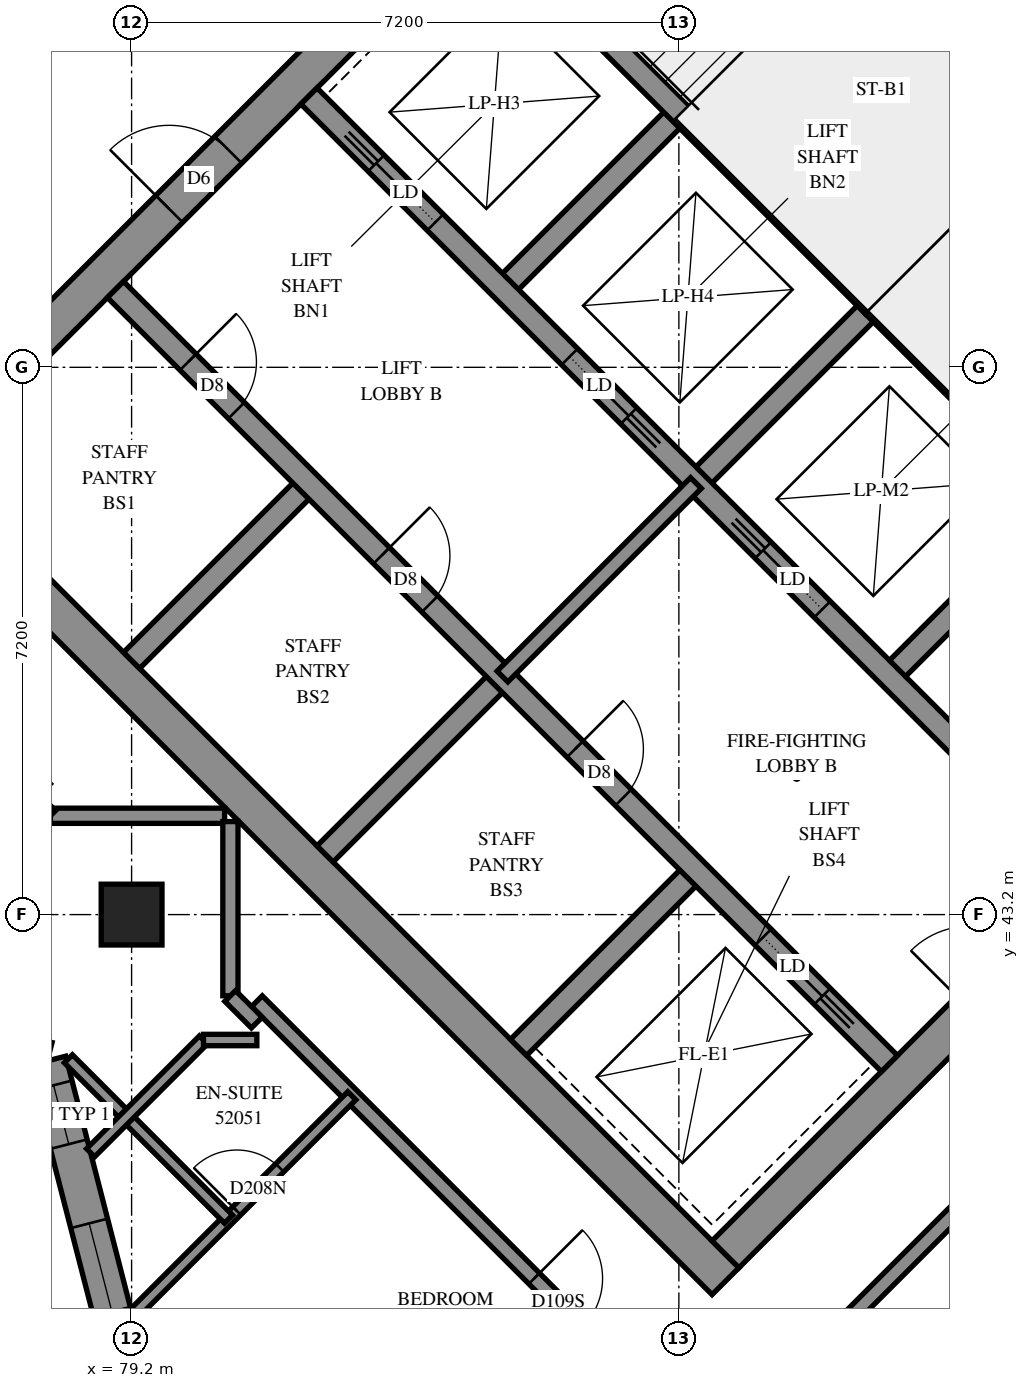
"""IFC4 building model, lengths in metres.
Left out: names, types, materials, properties, quantities, classifications, styles, units other than length and angle.
Written with IfcOpenShell. Run it as: python <this file> out.ifc"""

import sys

from ifc_helpers import new_model, si_unit, direction, frame, frame_2d, origin, origin_2d, place, context, subcontext, project, spatial, polyline, rectangle, outline, extrude, element, fill, save


model = new_model("IFC4")
c1 = context("Model", 3, precision=1e-05, world=origin(), true_north=direction((0.0, 1.0)))
c2 = subcontext(c1, "Body", "Model", "MODEL_VIEW")
j1 = project(units=[si_unit("LENGTHUNIT", "METRE"), si_unit("PLANEANGLEUNIT", "RADIAN")], contexts=[c1])
p1 = place(None, origin())
s1 = spatial("IfcSite", under=j1, at=p1, CompositionType="ELEMENT")
p2 = place(p1, origin())
s2 = spatial("IfcBuilding", under=s1, at=p2, CompositionType="ELEMENT")
p3 = place(p2, frame((0.0, 0.0, 193.0)))
s3 = spatial("IfcBuildingStorey", under=s2, at=p3, CompositionType="ELEMENT", Elevation=193.0)
p4 = place(p3, frame((79.2, 43.2, 0.0), z_axis=(0.0, 0.0, 1.0), x_axis=(1.0, 0.0, 0.0)))
e1 = element("IfcColumn", 1, at=p4, inside=s3, PredefinedType="COLUMN", context=c2, shape_type="SweptSolid", body=[
    extrude(rectangle(XDim=0.8, YDim=0.8, at=origin_2d()), origin(), (0.0, 0.0, 1.0), 3.1),
])
p5 = place(p3, frame((76.124, 49.267, -0.3), z_axis=(0.0, 0.0, 1.0), x_axis=(0.7071067812, -0.7071067812, 0.0)))
e2 = element("IfcWall", 2, at=p5, inside=s3, PredefinedType="SHEAR", context=c2, shape_type="SweptSolid", body=[
    extrude(rectangle(XDim=15.4, YDim=0.5, at=frame_2d((7.7, 0.0))), origin(), (0.0, 0.0, 1.0), 2.7),
])
p6 = place(p3, frame((86.66, 59.802, -0.3), z_axis=(0.0, 0.0, 1.0), x_axis=(0.7071067812, -0.7071067812, 0.0)))
e3 = element("IfcWall", 3, at=p6, inside=s3, PredefinedType="SHEAR", context=c2, shape_type="SweptSolid", body=[
    extrude(rectangle(XDim=15.4, YDim=0.5, at=frame_2d((7.7, 0.0))), origin(), (0.0, 0.0, 1.0), 2.7),
])
p7 = place(p6, frame((10.5, 0.0, 0.3)))
e4 = element("IfcOpeningElement", 4, at=p7, cuts=e3, PredefinedType="OPENING", context=c2, shape_type="SweptSolid", body=[
    extrude(rectangle(XDim=0.8, YDim=2.1, at=frame_2d((0.4, 1.05))), frame((0.0, 0.26, 0.0), z_axis=(0.0, -1.0, 0.0), x_axis=(1.0, 0.0, 0.0)), (0.0, 0.0, 1.0), 0.52),
])
p8 = place(p3, frame((76.478, 49.267, -0.3), z_axis=(0.0, 0.0, 1.0), x_axis=(0.7071067812, 0.7071067812, 0.0)))
e5 = element("IfcWall", 5, at=p8, inside=s3, PredefinedType="SHEAR", context=c2, shape_type="SweptSolid", body=[
    extrude(rectangle(XDim=14.4, YDim=0.5, at=frame_2d((7.2, 0.0))), origin(), (0.0, 0.0, 1.0), 2.7),
])
p9 = place(p8, frame((4.55, 0.0, 0.3)))
e6 = element("IfcOpeningElement", 6, at=p9, cuts=e5, PredefinedType="OPENING", context=c2, shape_type="SweptSolid", body=[
    extrude(rectangle(XDim=1.1, YDim=2.1, at=frame_2d((0.55, 1.05))), frame((0.0, 0.26, 0.0), z_axis=(0.0, -1.0, 0.0), x_axis=(1.0, 0.0, 0.0)), (0.0, 0.0, 1.0), 0.52),
])
p10 = place(p8, frame((11.35, 0.0, 0.3)))
e7 = element("IfcOpeningElement", 7, at=p10, cuts=e5, PredefinedType="OPENING", context=c2, shape_type="SweptSolid", body=[
    extrude(rectangle(XDim=1.1, YDim=2.1, at=frame_2d((0.55, 1.05))), frame((0.0, 0.26, 0.0), z_axis=(0.0, -1.0, 0.0), x_axis=(1.0, 0.0, 0.0)), (0.0, 0.0, 1.0), 0.52),
])
p11 = place(p3, frame((87.013, 38.731, -0.3), z_axis=(0.0, 0.0, 1.0), x_axis=(0.7071067812, 0.7071067812, 0.0)))
e8 = element("IfcWall", 8, at=p11, inside=s3, PredefinedType="SHEAR", context=c2, shape_type="SweptSolid", body=[
    extrude(rectangle(XDim=14.4, YDim=0.5, at=frame_2d((7.2, 0.0))), origin(), (0.0, 0.0, 1.0), 2.7),
])
p12 = place(p11, frame((4.55, 0.0, 0.3)))
e9 = element("IfcOpeningElement", 9, at=p12, cuts=e8, PredefinedType="OPENING", context=c2, shape_type="SweptSolid", body=[
    extrude(rectangle(XDim=1.1, YDim=2.1, at=frame_2d((0.55, 1.05))), frame((0.0, 0.26, 0.0), z_axis=(0.0, -1.0, 0.0), x_axis=(1.0, 0.0, 0.0)), (0.0, 0.0, 1.0), 0.52),
])
p13 = place(p11, frame((11.35, 0.0, 0.3)))
e10 = element("IfcOpeningElement", 10, at=p13, cuts=e8, PredefinedType="OPENING", context=c2, shape_type="SweptSolid", body=[
    extrude(rectangle(XDim=1.1, YDim=2.1, at=frame_2d((0.55, 1.05))), frame((0.0, 0.26, 0.0), z_axis=(0.0, -1.0, 0.0), x_axis=(1.0, 0.0, 0.0)), (0.0, 0.0, 1.0), 0.52),
])
for number, where, z_axis, x_axis in (
    (11, (79.2, 46.544, 0.0), (0.0, 0.0, 1.0), (0.707, 0.707, 0.0)),
    (12, (84.079, 51.423, 0.0), (0.0, 0.0, 1.0), (0.707, 0.707, 0.0)),
):
    element("IfcWall", number, at=place(p3, frame(where, z_axis=z_axis, x_axis=x_axis)), inside=s3, PredefinedType="SOLIDWALL", context=c2, shape_type="SweptSolid", body=[
        extrude(rectangle(XDim=3.3, YDim=0.3, at=frame_2d((1.65, 0.0))), origin(), (0.0, 0.0, 1.0), 3.1),
    ])
p14 = place(p3, frame((81.746, 43.999, 0.0), z_axis=(0.0, 0.0, 1.0), x_axis=(0.7071067812, 0.7071067812, 0.0)))
e13 = element("IfcWall", 13, at=p14, inside=s3, PredefinedType="SOLIDWALL", context=c2, shape_type="SweptSolid", body=[
    extrude(rectangle(XDim=3.3, YDim=0.3, at=frame_2d((1.65, 0.0))), origin(), (0.0, 0.0, 1.0), 3.1),
])
p15 = place(p3, frame((86.625, 48.878, 0.0), z_axis=(0.0, 0.0, 1.0), x_axis=(0.7071067812, 0.7071067812, 0.0)))
e14 = element("IfcWall", 14, at=p15, inside=s3, PredefinedType="SOLIDWALL", context=c2, shape_type="SweptSolid", body=[
    extrude(rectangle(XDim=3.3, YDim=0.3, at=frame_2d((1.65, 0.0))), origin(), (0.0, 0.0, 1.0), 3.1),
])
p16 = place(p3, frame((84.291, 41.453, 0.0), z_axis=(0.0, 0.0, 1.0), x_axis=(0.7071067812, 0.7071067812, 0.0)))
e15 = element("IfcWall", 15, at=p16, inside=s3, PredefinedType="SOLIDWALL", context=c2, shape_type="SweptSolid", body=[
    extrude(rectangle(XDim=3.3, YDim=0.3, at=frame_2d((1.65, 0.0))), origin(), (0.0, 0.0, 1.0), 3.1),
])
p17 = place(p3, frame((89.17, 46.332, 0.0), z_axis=(0.0, 0.0, 1.0), x_axis=(0.7071067812, 0.7071067812, 0.0)))
e16 = element("IfcWall", 16, at=p17, inside=s3, PredefinedType="SOLIDWALL", context=c2, shape_type="SweptSolid", body=[
    extrude(rectangle(XDim=3.3, YDim=0.3, at=frame_2d((1.65, 0.0))), origin(), (0.0, 0.0, 1.0), 3.1),
])
p18 = place(p3, frame((78.988, 51.423, 0.0), z_axis=(0.0, 0.0, 1.0), x_axis=(0.7071067812, -0.7071067812, 0.0)))
e17 = element("IfcWall", 17, at=p18, inside=s3, PredefinedType="SOLIDWALL", context=c2, shape_type="SweptSolid", body=[
    extrude(rectangle(XDim=14.4, YDim=0.3, at=frame_2d((7.2, 0.0))), origin(), (0.0, 0.0, 1.0), 3.1),
])
p19 = place(p18, frame((1.35, 0.0, 0.0)))
e18 = element("IfcOpeningElement", 18, at=p19, cuts=e17, PredefinedType="OPENING", context=c2, shape_type="SweptSolid", body=[
    extrude(rectangle(XDim=0.9, YDim=2.1, at=frame_2d((0.45, 1.05))), frame((0.0, 0.16, 0.0), z_axis=(0.0, -1.0, 0.0), x_axis=(1.0, 0.0, 0.0)), (0.0, 0.0, 1.0), 0.32),
])
p20 = place(p18, frame((4.95, 0.0, 0.0)))
e19 = element("IfcOpeningElement", 19, at=p20, cuts=e17, PredefinedType="OPENING", context=c2, shape_type="SweptSolid", body=[
    extrude(rectangle(XDim=0.9, YDim=2.1, at=frame_2d((0.45, 1.05))), frame((0.0, 0.16, 0.0), z_axis=(0.0, -1.0, 0.0), x_axis=(1.0, 0.0, 0.0)), (0.0, 0.0, 1.0), 0.32),
])
p21 = place(p18, frame((8.55, 0.0, 0.0)))
e20 = element("IfcOpeningElement", 20, at=p21, cuts=e17, PredefinedType="OPENING", context=c2, shape_type="SweptSolid", body=[
    extrude(rectangle(XDim=0.9, YDim=2.1, at=frame_2d((0.45, 1.05))), frame((0.0, 0.16, 0.0), z_axis=(0.0, -1.0, 0.0), x_axis=(1.0, 0.0, 0.0)), (0.0, 0.0, 1.0), 0.32),
])
p22 = place(p18, frame((12.05, 0.0, 0.0)))
e21 = element("IfcOpeningElement", 21, at=p22, cuts=e17, PredefinedType="OPENING", context=c2, shape_type="SweptSolid", body=[
    extrude(rectangle(XDim=1.1, YDim=2.1, at=frame_2d((0.55, 1.05))), frame((0.0, 0.16, 0.0), z_axis=(0.0, -1.0, 0.0), x_axis=(1.0, 0.0, 0.0)), (0.0, 0.0, 1.0), 0.32),
])
p23 = place(p3, frame((81.534, 53.969, 0.0), z_axis=(0.0, 0.0, 1.0), x_axis=(0.707103309, -0.7071102534, 0.0)))
e22 = element("IfcWall", 22, at=p23, inside=s3, PredefinedType="SOLIDWALL", context=c2, shape_type="SweptSolid", body=[
    extrude(rectangle(XDim=14.4, YDim=0.3, at=frame_2d((7.2, 0.0))), origin(), (0.0, 0.0, 1.0), 3.1),
])
p24 = place(p23, frame((1.25, 0.0, 0.0)))
e23 = element("IfcOpeningElement", 23, at=p24, cuts=e22, PredefinedType="OPENING", context=c2, shape_type="SweptSolid", body=[
    extrude(rectangle(XDim=1.1, YDim=2.1, at=frame_2d((0.55, 1.05))), frame((0.0, 0.16, 0.0), z_axis=(0.0, -1.0, 0.0), x_axis=(1.0, 0.0, 0.0)), (0.0, 0.0, 1.0), 0.32),
])
p25 = place(p23, frame((4.85, 0.0, 0.0)))
e24 = element("IfcOpeningElement", 24, at=p25, cuts=e22, PredefinedType="OPENING", context=c2, shape_type="SweptSolid", body=[
    extrude(rectangle(XDim=1.1, YDim=2.1, at=frame_2d((0.55, 1.05))), frame((0.0, 0.16, 0.0), z_axis=(0.0, -1.0, 0.0), x_axis=(1.0, 0.0, 0.0)), (0.0, 0.0, 1.0), 0.32),
])
p26 = place(p23, frame((8.45, 0.0, 0.0)))
e25 = element("IfcOpeningElement", 25, at=p26, cuts=e22, PredefinedType="OPENING", context=c2, shape_type="SweptSolid", body=[
    extrude(rectangle(XDim=1.1, YDim=2.1, at=frame_2d((0.55, 1.05))), frame((0.0, 0.16, 0.0), z_axis=(0.0, -1.0, 0.0), x_axis=(1.0, 0.0, 0.0)), (0.0, 0.0, 1.0), 0.32),
])
p27 = place(p23, frame((12.05, 0.0, 0.0)))
e26 = element("IfcOpeningElement", 26, at=p27, cuts=e22, PredefinedType="OPENING", context=c2, shape_type="SweptSolid", body=[
    extrude(rectangle(XDim=1.1, YDim=2.1, at=frame_2d((0.55, 1.05))), frame((0.0, 0.16, 0.0), z_axis=(0.0, -1.0, 0.0), x_axis=(1.0, 0.0, 0.0)), (0.0, 0.0, 1.0), 0.32),
])
for number, where, z_axis, x_axis in (
    (27, (83.867, 56.302, 0.0), (0.0, 0.0, 1.0), (0.707, -0.707, 0.0)),
    (28, (88.958, 51.211, 0.0), (0.0, 0.0, 1.0), (0.707, -0.707, 0.0)),
):
    element("IfcWall", number, at=place(p3, frame(where, z_axis=z_axis, x_axis=x_axis)), inside=s3, PredefinedType="SOLIDWALL", context=c2, shape_type="SweptSolid", body=[
        extrude(rectangle(XDim=7.2, YDim=0.3, at=frame_2d((3.6, 0.0))), origin(), (0.0, 0.0, 1.0), 3.1),
    ])
p28 = place(p3, frame((88.958, 51.211, 0.0), z_axis=(0.0, 0.0, 1.0), x_axis=(0.7071067812, 0.7071067812, 0.0)))
e29 = element("IfcWall", 29, at=p28, inside=s3, PredefinedType="SOLIDWALL", context=c2, shape_type="SweptSolid", body=[
    extrude(rectangle(XDim=4.2, YDim=0.3, at=frame_2d((2.1, 0.0))), origin(), (0.0, 0.0, 1.0), 3.1),
])
p29 = place(p3, frame((74.321, 42.253, 0.0), z_axis=(0.0, 0.0, 1.0), x_axis=(0.9679758757, -0.2510432315, 0.0)))
e30 = element("IfcWall", 30, at=p29, inside=s3, PredefinedType="SOLIDWALL", context=c2, shape_type="SweptSolid", body=[
    extrude(outline(polyline([(0.044, -0.25), (3.748, -0.25), (4.043, 0.25), (-0.044, 0.25), (0.044, -0.25)])), origin(), (0.0, 0.0, 1.0), 3.1),
])
p30 = place(p29, frame((1.909, 0.0, 0.45)))
e31 = element("IfcOpeningElement", 31, at=p30, cuts=e30, PredefinedType="OPENING", context=c2, shape_type="SweptSolid", body=[
    extrude(rectangle(XDim=1.2, YDim=2.5, at=frame_2d((0.6, 1.25))), frame((0.0, 0.26, 0.0), z_axis=(0.0, -1.0, 0.0), x_axis=(1.0, 0.0, 0.0)), (0.0, 0.0, 1.0), 0.52),
])
p31 = place(p3, frame((78.091, 41.275, 0.0), z_axis=(0.0, 0.0, 1.0), x_axis=(0.2493551668, -0.9684121028, 0.0)))
e32 = element("IfcWall", 32, at=p31, inside=s3, PredefinedType="SOLIDWALL", context=c2, shape_type="SweptSolid", body=[
    extrude(outline(polyline([(0.147, -0.25), (4.868, -0.25), (4.585, 0.25), (-0.147, 0.25), (0.147, -0.25)])), origin(), (0.0, 0.0, 1.0), 3.1),
])
p32 = place(p31, frame((2.207, 0.0, 0.45)))
e33 = element("IfcOpeningElement", 33, at=p32, cuts=e32, PredefinedType="OPENING", context=c2, shape_type="SweptSolid", body=[
    extrude(rectangle(XDim=1.2, YDim=2.5, at=frame_2d((0.6, 1.25))), frame((0.0, 0.26, 0.0), z_axis=(0.0, -1.0, 0.0), x_axis=(1.0, 0.0, 0.0)), (0.0, 0.0, 1.0), 0.52),
])
p33 = place(p31, frame((0.331, 0.0, 0.45)))
e34 = element("IfcOpeningElement", 34, at=p33, cuts=e32, PredefinedType="OPENING", context=c2, shape_type="SweptSolid", body=[
    extrude(rectangle(XDim=0.8, YDim=2.5, at=frame_2d((0.4, 1.25))), frame((0.0, 0.26, 0.0), z_axis=(0.0, -1.0, 0.0), x_axis=(1.0, 0.0, 0.0)), (0.0, 0.0, 1.0), 0.52),
])
p34 = place(p3, frame((84.079, 46.332, 0.0), z_axis=(0.0, 0.0, 1.0), x_axis=(0.7071067812, 0.7071067812, 0.0)))
e35 = element("IfcWall", 35, at=p34, inside=s3, PredefinedType="PARTITIONING", context=c2, shape_type="SweptSolid", body=[
    extrude(rectangle(XDim=3.6, YDim=0.2, at=frame_2d((1.8, 0.0))), origin(), (0.0, 0.0, 1.0), 3.1),
])
p35 = place(p3, frame((84.976, 31.95, 0.0), z_axis=(0.0, 0.0, 1.0), x_axis=(0.7072313319, 0.7069822085, 0.0)))
e36 = element("IfcWall", 36, at=p35, inside=s3, PredefinedType="PARTITIONING", context=c2, shape_type="SweptSolid", body=[
    extrude(rectangle(XDim=10.035, YDim=0.2, at=frame_2d((5.018, 0.0))), origin(), (0.0, 0.0, 1.0), 3.1),
])
p36 = place(p3, frame((86.835, 36.079, 0.0), z_axis=(0.0, 0.0, 1.0), x_axis=(0.7071067812, 0.7071067812, 0.0)))
e37 = element("IfcWall", 37, at=p36, inside=s3, PredefinedType="PARTITIONING", context=c2, shape_type="SweptSolid", body=[
    extrude(rectangle(XDim=8.2, YDim=0.2, at=frame_2d((4.1, 0.0))), origin(), (0.0, 0.0, 1.0), 3.1),
])
p37 = place(p3, frame((80.849, 42.061, 0.0), z_axis=(0.0, 0.0, 1.0), x_axis=(0.7071067812, -0.7071067812, 0.0)))
e38 = element("IfcWall", 38, at=p37, inside=s3, PredefinedType="PARTITIONING", context=c2, shape_type="SweptSolid", body=[
    extrude(rectangle(XDim=6.964, YDim=0.2, at=frame_2d((3.482, 0.0))), origin(), (0.0, 0.0, 1.0), 3.1),
])
p38 = place(p37, frame((5.159, 0.0, 0.0)))
e39 = element("IfcOpeningElement", 39, at=p38, cuts=e38, PredefinedType="OPENING", context=c2, shape_type="SweptSolid", body=[
    extrude(rectangle(XDim=0.9, YDim=2.1, at=frame_2d((0.45, 1.05))), frame((0.0, 0.11, 0.0), z_axis=(0.0, -1.0, 0.0), x_axis=(1.0, 0.0, 0.0)), (0.0, 0.0, 1.0), 0.22),
])
p39 = place(p3, frame((79.211, 37.93, 0.0), z_axis=(0.0, 0.0, 1.0), x_axis=(0.7070945332, 0.707119029, 0.0)))
e40 = element("IfcWall", 40, at=p39, inside=s3, PredefinedType="PARTITIONING", context=c2, shape_type="SweptSolid", body=[
    extrude(rectangle(XDim=4.082, YDim=0.15, at=frame_2d((2.041, 0.0))), origin(), (0.0, 0.0, 1.0), 3.1),
])
p40 = place(p39, frame((1.942, 0.0, 0.0)))
e41 = element("IfcOpeningElement", 41, at=p40, cuts=e40, PredefinedType="OPENING", context=c2, shape_type="SweptSolid", body=[
    extrude(rectangle(XDim=0.8, YDim=2.1, at=frame_2d((0.4, 1.05))), frame((0.0, 0.085, 0.0), z_axis=(0.0, -1.0, 0.0), x_axis=(1.0, 0.0, 0.0)), (0.0, 0.0, 1.0), 0.17),
])
p41 = place(p3, frame((78.368, 41.303, 0.0), z_axis=(0.0, 0.0, 1.0), x_axis=(0.7065867451, -0.7076264351, 0.0)))
e42 = element("IfcWall", 42, at=p41, inside=s3, PredefinedType="PARTITIONING", context=c2, shape_type="SweptSolid", body=[
    extrude(rectangle(XDim=2.982, YDim=0.15, at=frame_2d((1.491, 0.0))), origin(), (0.0, 0.0, 1.0), 3.1),
])
for number, where, z_axis, x_axis in (
    (43, (78.132, 44.5, 0.0), (0.0, 0.0, 1.0), (1.0, 0.0, 0.0)),
    (44, (80.5, 42.132, 0.0), (0.0, 0.0, 1.0), (0.0, 1.0, 0.0)),
):
    element("IfcWall", number, at=place(p3, frame(where, z_axis=z_axis, x_axis=x_axis)), inside=s3, PredefinedType="PARTITIONING", context=c2, shape_type="SweptSolid", body=[
        extrude(rectangle(XDim=2.292, YDim=0.2, at=frame_2d((1.146, 0.0))), origin(), (0.0, 0.0, 1.0), 3.1),
    ])
p42 = place(p3, frame((78.661, 40.067, 0.0), z_axis=(0.0, 0.0, 1.0), x_axis=(0.7070829621, 0.7071305995, 0.0)))
e45 = element("IfcWall", 45, at=p42, inside=s3, PredefinedType="PARTITIONING", context=c2, shape_type="SweptSolid", body=[
    extrude(rectangle(XDim=2.099, YDim=0.15, at=frame_2d((1.05, 0.0))), origin(), (0.0, 0.0, 1.0), 3.1),
])
p43 = place(p3, frame((80.146, 41.55, 0.0), z_axis=(0.0, 0.0, 1.0), x_axis=(1.0, 0.0, 0.0)))
e46 = element("IfcWall", 46, at=p43, inside=s3, PredefinedType="PARTITIONING", context=c2, shape_type="SweptSolid", body=[
    extrude(rectangle(XDim=0.702, YDim=0.15, at=frame_2d((0.351, 0.0))), origin(), (0.0, 0.0, 1.0), 3.1),
])
for number, where, z_axis, x_axis in (
    (47, (77.779, 44.847, 0.0), (0.0, 0.0, 1.0), (0.707, -0.707, 0.0)),
    (48, (80.497, 42.129, 0.0), (0.0, 0.0, 1.0), (0.707, -0.707, 0.0)),
):
    element("IfcWall", number, at=place(p3, frame(where, z_axis=z_axis, x_axis=x_axis)), inside=s3, PredefinedType="PARTITIONING", context=c2, shape_type="SweptSolid", body=[
        extrude(rectangle(XDim=0.495, YDim=0.2, at=frame_2d((0.247, 0.0))), origin(), (0.0, 0.0, 1.0), 3.1),
    ])
p44 = place(p32, origin())
e49 = element("IfcWindow", 49, at=p44, inside=s3, PartitioningType="SINGLE_PANEL", PredefinedType="WINDOW", context=c2, shape_type="SweptSolid", body=[
    extrude(rectangle(XDim=1.2, YDim=2.5, at=frame_2d((0.6, 1.25))), frame((0.0, 0.18, 0.0), z_axis=(0.0, -1.0, 0.0), x_axis=(1.0, 0.0, 0.0)), (0.0, 0.0, 1.0), 0.06),
])
fill(e33, e49)
p45 = place(p9, origin())
e50 = element("IfcDoor", 50, at=p45, inside=s3, OperationType="DOUBLE_DOOR_SINGLE_SWING", PredefinedType="DOOR", context=c2, shape_type="SweptSolid", body=[
    extrude(rectangle(XDim=1.1, YDim=2.1, at=frame_2d((0.55, 1.05))), frame((0.0, 0.025, 0.0), z_axis=(0.0, -1.0, 0.0), x_axis=(1.0, 0.0, 0.0)), (0.0, 0.0, 1.0), 0.05),
])
fill(e6, e50)
p46 = place(p19, origin())
e51 = element("IfcDoor", 51, at=p46, inside=s3, OperationType="SINGLE_SWING_LEFT", PredefinedType="DOOR", context=c2, shape_type="SweptSolid", body=[
    extrude(rectangle(XDim=0.9, YDim=2.1, at=frame_2d((0.45, 1.05))), frame((0.0, 0.025, 0.0), z_axis=(0.0, -1.0, 0.0), x_axis=(1.0, 0.0, 0.0)), (0.0, 0.0, 1.0), 0.05),
])
fill(e18, e51)
p47 = place(p20, origin())
e52 = element("IfcDoor", 52, at=p47, inside=s3, OperationType="SINGLE_SWING_LEFT", PredefinedType="DOOR", context=c2, shape_type="SweptSolid", body=[
    extrude(rectangle(XDim=0.9, YDim=2.1, at=frame_2d((0.45, 1.05))), frame((0.0, 0.025, 0.0), z_axis=(0.0, -1.0, 0.0), x_axis=(1.0, 0.0, 0.0)), (0.0, 0.0, 1.0), 0.05),
])
fill(e19, e52)
p48 = place(p21, origin())
e53 = element("IfcDoor", 53, at=p48, inside=s3, OperationType="SINGLE_SWING_LEFT", PredefinedType="DOOR", context=c2, shape_type="SweptSolid", body=[
    extrude(rectangle(XDim=0.9, YDim=2.1, at=frame_2d((0.45, 1.05))), frame((0.0, 0.025, 0.0), z_axis=(0.0, -1.0, 0.0), x_axis=(1.0, 0.0, 0.0)), (0.0, 0.0, 1.0), 0.05),
])
fill(e20, e53)
p49 = place(p22, origin())
e54 = element("IfcDoor", 54, at=p49, inside=s3, OperationType="SLIDING_TO_RIGHT", PredefinedType="DOOR", context=c2, shape_type="SweptSolid", body=[
    extrude(rectangle(XDim=1.1, YDim=2.1, at=frame_2d((0.55, 1.05))), frame((0.0, 0.025, 0.0), z_axis=(0.0, -1.0, 0.0), x_axis=(1.0, 0.0, 0.0)), (0.0, 0.0, 1.0), 0.05),
])
fill(e21, e54)
p50 = place(p24, origin())
e55 = element("IfcDoor", 55, at=p50, inside=s3, OperationType="SLIDING_TO_LEFT", PredefinedType="DOOR", context=c2, shape_type="SweptSolid", body=[
    extrude(rectangle(XDim=1.1, YDim=2.1, at=frame_2d((0.55, 1.05))), frame((0.0, 0.025, 0.0), z_axis=(0.0, -1.0, 0.0), x_axis=(1.0, 0.0, 0.0)), (0.0, 0.0, 1.0), 0.05),
])
fill(e23, e55)
p51 = place(p25, origin())
e56 = element("IfcDoor", 56, at=p51, inside=s3, OperationType="SLIDING_TO_RIGHT", PredefinedType="DOOR", context=c2, shape_type="SweptSolid", body=[
    extrude(rectangle(XDim=1.1, YDim=2.1, at=frame_2d((0.55, 1.05))), frame((0.0, 0.025, 0.0), z_axis=(0.0, -1.0, 0.0), x_axis=(1.0, 0.0, 0.0)), (0.0, 0.0, 1.0), 0.05),
])
fill(e24, e56)
p52 = place(p26, origin())
e57 = element("IfcDoor", 57, at=p52, inside=s3, OperationType="SLIDING_TO_LEFT", PredefinedType="DOOR", context=c2, shape_type="SweptSolid", body=[
    extrude(rectangle(XDim=1.1, YDim=2.1, at=frame_2d((0.55, 1.05))), frame((0.0, 0.025, 0.0), z_axis=(0.0, -1.0, 0.0), x_axis=(1.0, 0.0, 0.0)), (0.0, 0.0, 1.0), 0.05),
])
fill(e25, e57)
p53 = place(p38, origin())
e58 = element("IfcDoor", 58, at=p53, inside=s3, OperationType="SINGLE_SWING_RIGHT", PredefinedType="DOOR", context=c2, shape_type="SweptSolid", body=[
    extrude(rectangle(XDim=0.9, YDim=2.1, at=frame_2d((0.45, 1.05))), frame((0.0, 0.025, 0.0), z_axis=(0.0, -1.0, 0.0), x_axis=(1.0, 0.0, 0.0)), (0.0, 0.0, 1.0), 0.05),
])
fill(e39, e58)
p54 = place(p40, origin())
e59 = element("IfcDoor", 59, at=p54, inside=s3, OperationType="SINGLE_SWING_RIGHT", PredefinedType="DOOR", context=c2, shape_type="SweptSolid", body=[
    extrude(rectangle(XDim=0.8, YDim=2.1, at=frame_2d((0.4, 1.05))), frame((0.0, 0.025, 0.0), z_axis=(0.0, -1.0, 0.0), x_axis=(1.0, 0.0, 0.0)), (0.0, 0.0, 1.0), 0.05),
])
fill(e41, e59)
p55 = place(p33, origin())
e60 = element("IfcWindow", 60, at=p55, inside=s3, PartitioningType="SINGLE_PANEL", PredefinedType="WINDOW", context=c2, shape_type="SweptSolid", body=[
    extrude(rectangle(XDim=0.8, YDim=2.5, at=frame_2d((0.4, 1.25))), frame((0.0, 0.18, 0.0), z_axis=(0.0, -1.0, 0.0), x_axis=(1.0, 0.0, 0.0)), (0.0, 0.0, 1.0), 0.06),
])
fill(e34, e60)
save(model, sys.argv[1])
